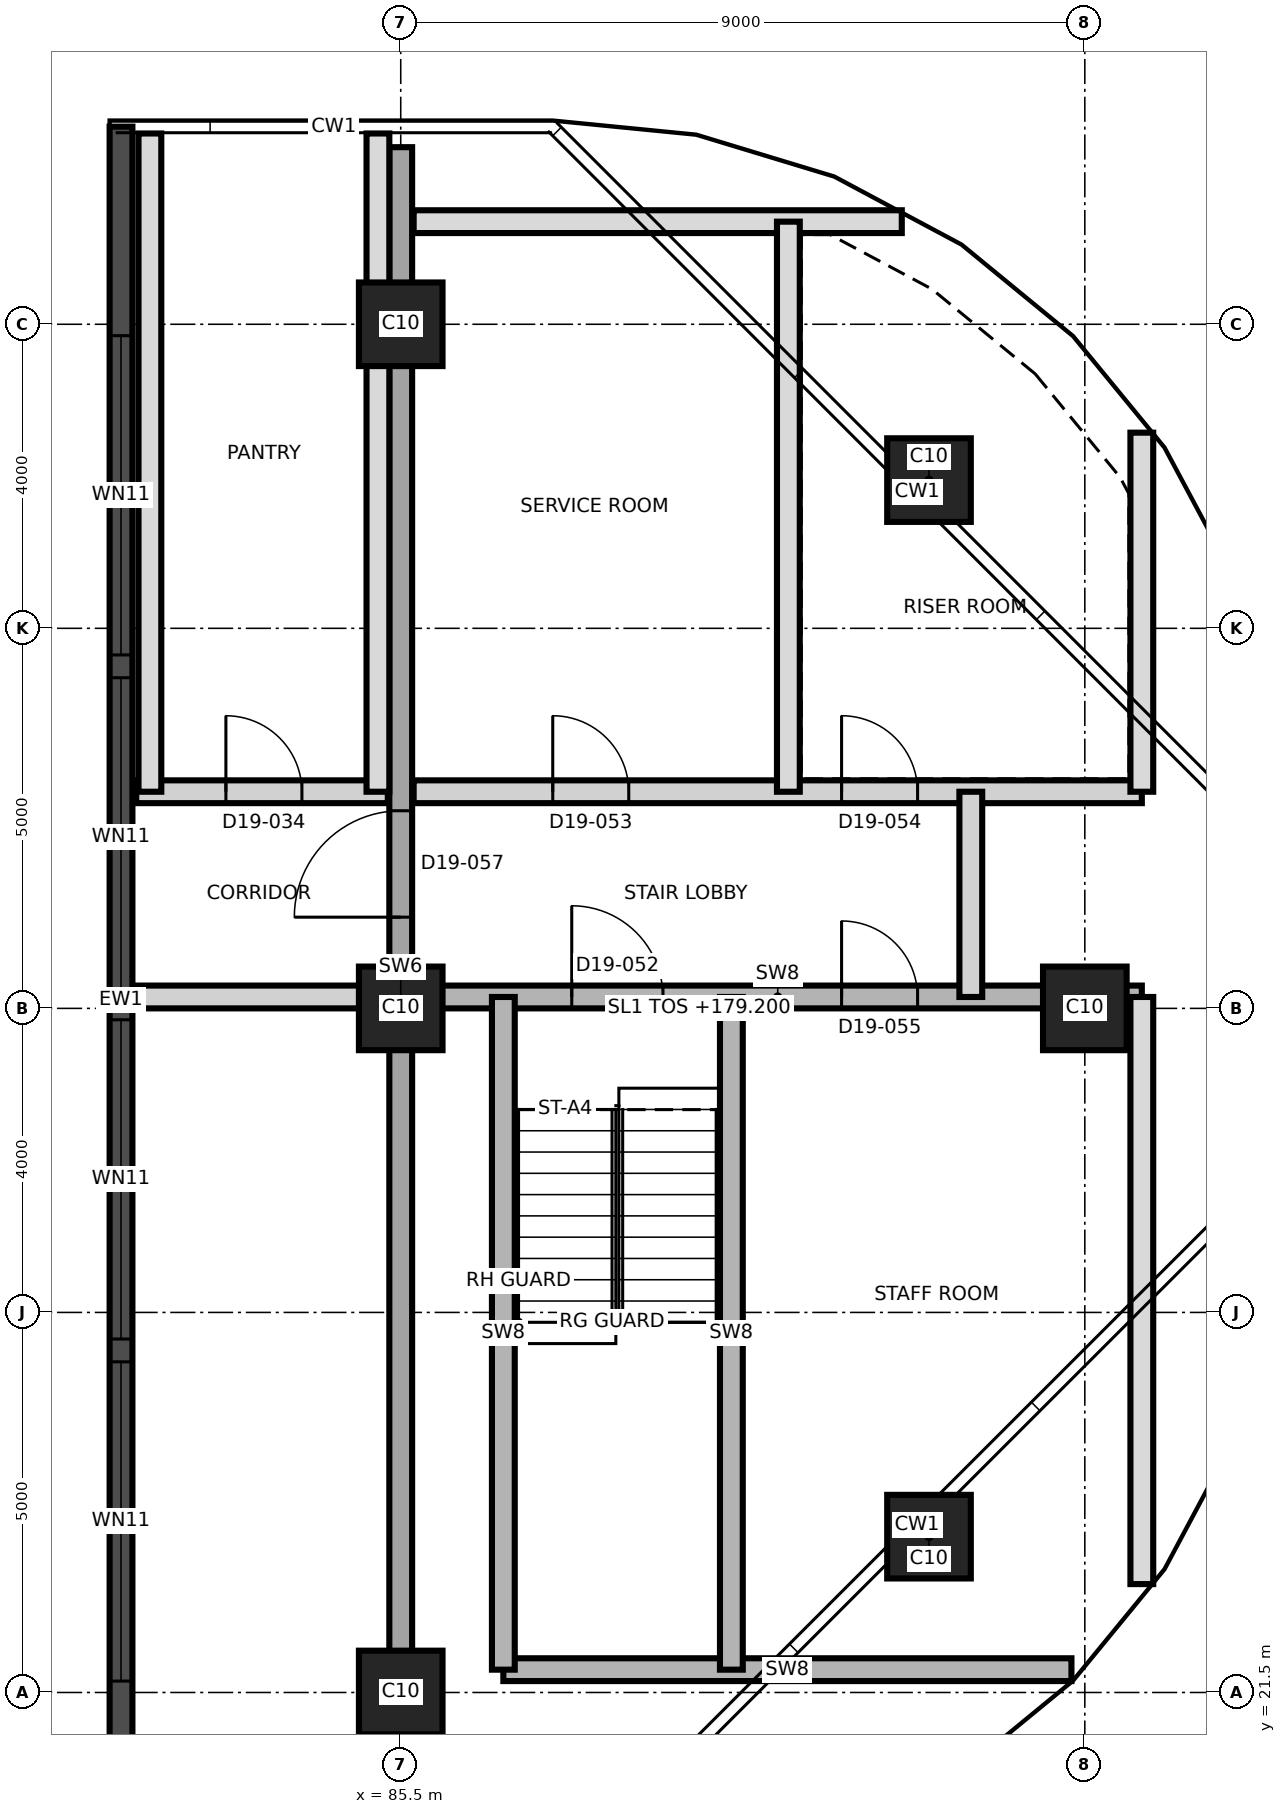
"""IFC4 building model, lengths in metres.
Left out: names, types, materials, properties, quantities, classifications, styles, units other than length and angle.
Written with IfcOpenShell. Run it as: python <this file> out.ifc"""

import sys

from ifc_helpers import new_model, si_unit, direction, frame, frame_2d, origin, origin_2d, place, context, subcontext, project, spatial, rectangle, extrude, element, fill, save


model = new_model("IFC4")
c1 = context("Model", 3, precision=1e-05, world=origin(), true_north=direction((0.0, 1.0)))
c2 = subcontext(c1, "Body", "Model", "MODEL_VIEW")
j1 = project(units=[si_unit("LENGTHUNIT", "METRE"), si_unit("PLANEANGLEUNIT", "RADIAN")], contexts=[c1])
p1 = place(None, origin())
s1 = spatial("IfcSite", under=j1, at=p1, CompositionType="ELEMENT")
p2 = place(p1, origin())
s2 = spatial("IfcBuilding", under=s1, at=p2, CompositionType="ELEMENT")
p3 = place(p2, frame((0.0, 0.0, 179.2)))
s3 = spatial("IfcBuildingStorey", under=s2, at=p3, CompositionType="ELEMENT", Elevation=179.2)
for number, where, z_axis, x_axis in (
    (1, (85.5, 21.5, 0.0), (0.0, 0.0, 1.0), (1.0, 0.0, 0.0)),
    (2, (92.45, 23.55, 0.0), (0.0, 0.0, 1.0), (1.0, 0.0, 0.0)),
    (3, (85.5, 30.5, 0.0), (0.0, 0.0, 1.0), (1.0, 0.0, 0.0)),
    (4, (94.5, 30.5, 0.0), (0.0, 0.0, 1.0), (1.0, 0.0, 0.0)),
    (5, (92.45, 37.45, 0.0), (0.0, 0.0, 1.0), (1.0, 0.0, 0.0)),
    (6, (85.5, 39.5, 0.0), (0.0, 0.0, 1.0), (1.0, 0.0, 0.0)),
):
    element("IfcColumn", number, at=place(p3, frame(where, z_axis=z_axis, x_axis=x_axis)), inside=s3, PredefinedType="COLUMN", context=c2, shape_type="SweptSolid", body=[
        extrude(rectangle(XDim=1.1, YDim=1.1, at=origin_2d()), origin(), (0.0, 0.0, 1.0), 3.7),
    ])
p4 = place(p3, frame((85.5, 19.17, 0.0), z_axis=(0.0, 0.0, 1.0), x_axis=(0.0, 1.0, 0.0)))
e7 = element("IfcWall", 7, at=p4, inside=s3, PredefinedType="SHEAR", context=c2, shape_type="SweptSolid", body=[
    extrude(rectangle(XDim=22.66, YDim=0.3, at=frame_2d((11.33, 0.0))), origin(), (0.0, 0.0, 1.0), 3.7),
])
p5 = place(p4, frame((12.53, 0.0, 0.0)))
e8 = element("IfcOpeningElement", 8, at=p5, cuts=e7, PredefinedType="OPENING", context=c2, shape_type="SweptSolid", body=[
    extrude(rectangle(XDim=1.4, YDim=2.1, at=frame_2d((0.7, 1.05))), frame((0.0, 0.16, 0.0), z_axis=(0.0, -1.0, 0.0), x_axis=(1.0, 0.0, 0.0)), (0.0, 0.0, 1.0), 0.32),
])
p6 = place(p3, frame((81.82, 42.1, 0.0), z_axis=(0.0, 0.0, 1.0), x_axis=(0.0, -1.0, 0.0)))
e9 = element("IfcWall", 9, at=p6, inside=s3, PredefinedType="SOLIDWALL", context=c2, shape_type="SweptSolid", body=[
    extrude(rectangle(XDim=22.98, YDim=0.3, at=frame_2d((11.49, 0.0))), origin(), (0.0, 0.0, 1.0), 3.4),
])
p7 = place(p6, frame((2.75, 0.0, 0.9)))
e10 = element("IfcOpeningElement", 10, at=p7, cuts=e9, PredefinedType="OPENING", context=c2, shape_type="SweptSolid", body=[
    extrude(rectangle(XDim=4.2, YDim=1.5, at=frame_2d((2.1, 0.75))), frame((0.0, 0.16, 0.0), z_axis=(0.0, -1.0, 0.0), x_axis=(1.0, 0.0, 0.0)), (0.0, 0.0, 1.0), 0.32),
])
p8 = place(p6, frame((7.25, 0.0, 0.9)))
e11 = element("IfcOpeningElement", 11, at=p8, cuts=e9, PredefinedType="OPENING", context=c2, shape_type="SweptSolid", body=[
    extrude(rectangle(XDim=4.2, YDim=1.5, at=frame_2d((2.1, 0.75))), frame((0.0, 0.16, 0.0), z_axis=(0.0, -1.0, 0.0), x_axis=(1.0, 0.0, 0.0)), (0.0, 0.0, 1.0), 0.32),
])
p9 = place(p6, frame((11.75, 0.0, 0.9)))
e12 = element("IfcOpeningElement", 12, at=p9, cuts=e9, PredefinedType="OPENING", context=c2, shape_type="SweptSolid", body=[
    extrude(rectangle(XDim=4.2, YDim=1.5, at=frame_2d((2.1, 0.75))), frame((0.0, 0.16, 0.0), z_axis=(0.0, -1.0, 0.0), x_axis=(1.0, 0.0, 0.0)), (0.0, 0.0, 1.0), 0.32),
])
p10 = place(p6, frame((16.25, 0.0, 0.9)))
e13 = element("IfcOpeningElement", 13, at=p10, cuts=e9, PredefinedType="OPENING", context=c2, shape_type="SweptSolid", body=[
    extrude(rectangle(XDim=4.2, YDim=1.5, at=frame_2d((2.1, 0.75))), frame((0.0, 0.16, 0.0), z_axis=(0.0, -1.0, 0.0), x_axis=(1.0, 0.0, 0.0)), (0.0, 0.0, 1.0), 0.32),
])
p11 = place(p3, frame((86.85, 21.8, 0.0), z_axis=(0.0, 0.0, 1.0), x_axis=(1.0, 0.0, 0.0)))
e14 = element("IfcWall", 14, at=p11, inside=s3, PredefinedType="SHEAR", context=c2, shape_type="SweptSolid", body=[
    extrude(rectangle(XDim=7.474, YDim=0.3, at=frame_2d((3.737, 0.0))), origin(), (0.0, 0.0, 1.0), 3.4),
])
p12 = place(p3, frame((82.02, 30.65, 0.0), z_axis=(0.0, 0.0, 1.0), x_axis=(1.0, 0.0, 0.0)))
e15 = element("IfcWall", 15, at=p12, inside=s3, PredefinedType="PARTITIONING", context=c2, shape_type="SweptSolid", body=[
    extrude(rectangle(XDim=3.31, YDim=0.3, at=frame_2d((1.655, 0.0))), origin(), (0.0, 0.0, 1.0), 3.4),
])
p13 = place(p3, frame((85.67, 30.65, 0.0), z_axis=(0.0, 0.0, 1.0), x_axis=(1.0, 0.0, 0.0)))
e16 = element("IfcWall", 16, at=p13, inside=s3, PredefinedType="SHEAR", context=c2, shape_type="SweptSolid", body=[
    extrude(rectangle(XDim=9.58, YDim=0.3, at=frame_2d((4.79, 0.0))), origin(), (0.0, 0.0, 1.0), 3.4),
])
p14 = place(p13, frame((2.08, 0.0, 0.0)))
e17 = element("IfcOpeningElement", 17, at=p14, cuts=e16, PredefinedType="OPENING", context=c2, shape_type="SweptSolid", body=[
    extrude(rectangle(XDim=1.2, YDim=2.1, at=frame_2d((0.6, 1.05))), frame((0.0, 0.16, 0.0), z_axis=(0.0, -1.0, 0.0), x_axis=(1.0, 0.0, 0.0)), (0.0, 0.0, 1.0), 0.32),
])
p15 = place(p13, frame((5.63, 0.0, 0.0)))
e18 = element("IfcOpeningElement", 18, at=p15, cuts=e16, PredefinedType="OPENING", context=c2, shape_type="SweptSolid", body=[
    extrude(rectangle(XDim=1.0, YDim=2.1, at=frame_2d((0.5, 1.05))), frame((0.0, 0.16, 0.0), z_axis=(0.0, -1.0, 0.0), x_axis=(1.0, 0.0, 0.0)), (0.0, 0.0, 1.0), 0.32),
])
p16 = place(p3, frame((82.02, 33.35, 0.0), z_axis=(0.0, 0.0, 1.0), x_axis=(1.0, 0.0, 0.0)))
e19 = element("IfcWall", 19, at=p16, inside=s3, PredefinedType="PARTITIONING", context=c2, shape_type="SweptSolid", body=[
    extrude(rectangle(XDim=3.31, YDim=0.3, at=frame_2d((1.655, 0.0))), origin(), (0.0, 0.0, 1.0), 3.4),
])
p17 = place(p16, frame((1.18, 0.0, 0.0)))
e20 = element("IfcOpeningElement", 20, at=p17, cuts=e19, PredefinedType="OPENING", context=c2, shape_type="SweptSolid", body=[
    extrude(rectangle(XDim=1.0, YDim=2.1, at=frame_2d((0.5, 1.05))), frame((0.0, 0.16, 0.0), z_axis=(0.0, -1.0, 0.0), x_axis=(1.0, 0.0, 0.0)), (0.0, 0.0, 1.0), 0.32),
])
p18 = place(p3, frame((85.67, 33.35, 0.0), z_axis=(0.0, 0.0, 1.0), x_axis=(1.0, 0.0, 0.0)))
e21 = element("IfcWall", 21, at=p18, inside=s3, PredefinedType="PARTITIONING", context=c2, shape_type="SweptSolid", body=[
    extrude(rectangle(XDim=9.58, YDim=0.3, at=frame_2d((4.79, 0.0))), origin(), (0.0, 0.0, 1.0), 3.4),
])
p19 = place(p18, frame((1.83, 0.0, 0.0)))
e22 = element("IfcOpeningElement", 22, at=p19, cuts=e21, PredefinedType="OPENING", context=c2, shape_type="SweptSolid", body=[
    extrude(rectangle(XDim=1.0, YDim=2.1, at=frame_2d((0.5, 1.05))), frame((0.0, 0.16, 0.0), z_axis=(0.0, -1.0, 0.0), x_axis=(1.0, 0.0, 0.0)), (0.0, 0.0, 1.0), 0.32),
])
p20 = place(p18, frame((5.63, 0.0, 0.0)))
e23 = element("IfcOpeningElement", 23, at=p20, cuts=e21, PredefinedType="OPENING", context=c2, shape_type="SweptSolid", body=[
    extrude(rectangle(XDim=1.0, YDim=2.1, at=frame_2d((0.5, 1.05))), frame((0.0, 0.16, 0.0), z_axis=(0.0, -1.0, 0.0), x_axis=(1.0, 0.0, 0.0)), (0.0, 0.0, 1.0), 0.32),
])
p21 = place(p3, frame((85.67, 40.85, 0.0), z_axis=(0.0, 0.0, 1.0), x_axis=(1.0, 0.0, 0.0)))
e24 = element("IfcWall", 24, at=p21, inside=s3, PredefinedType="PARTITIONING", context=c2, shape_type="SweptSolid", body=[
    extrude(rectangle(XDim=6.422, YDim=0.3, at=frame_2d((3.211, 0.0))), origin(), (0.0, 0.0, 1.0), 3.4),
])
for number, where, z_axis, x_axis in (
    (25, (82.2, 33.35, 0.0), (0.0, 0.0, 1.0), (0.0, 1.0, 0.0)),
    (26, (85.2, 33.35, 0.0), (0.0, 0.0, 1.0), (0.0, 1.0, 0.0)),
):
    element("IfcWall", number, at=place(p3, frame(where, z_axis=z_axis, x_axis=x_axis)), inside=s3, PredefinedType="PARTITIONING", context=c2, shape_type="SweptSolid", body=[
        extrude(rectangle(XDim=8.66, YDim=0.3, at=frame_2d((4.33, 0.0))), origin(), (0.0, 0.0, 1.0), 3.4),
    ])
for number, where, z_axis, x_axis in (
    (27, (86.85, 21.8, 0.0), (0.0, 0.0, 1.0), (0.0, 1.0, 0.0)),
    (28, (89.85, 21.8, 0.0), (0.0, 0.0, 1.0), (0.0, 1.0, 0.0)),
):
    element("IfcWall", number, at=place(p3, frame(where, z_axis=z_axis, x_axis=x_axis)), inside=s3, PredefinedType="SHEAR", context=c2, shape_type="SweptSolid", body=[
        extrude(rectangle(XDim=8.85, YDim=0.3, at=frame_2d((4.425, 0.0))), origin(), (0.0, 0.0, 1.0), 3.4),
    ])
p22 = place(p3, frame((90.6, 33.35, 0.0), z_axis=(0.0, 0.0, 1.0), x_axis=(0.0, 1.0, 0.0)))
e29 = element("IfcWall", 29, at=p22, inside=s3, PredefinedType="PARTITIONING", context=c2, shape_type="SweptSolid", body=[
    extrude(rectangle(XDim=7.5, YDim=0.3, at=frame_2d((3.75, 0.0))), origin(), (0.0, 0.0, 1.0), 3.4),
])
p23 = place(p3, frame((93.0, 30.65, 0.0), z_axis=(0.0, 0.0, 1.0), x_axis=(0.0, 1.0, 0.0)))
e30 = element("IfcWall", 30, at=p23, inside=s3, PredefinedType="PARTITIONING", context=c2, shape_type="SweptSolid", body=[
    extrude(rectangle(XDim=2.7, YDim=0.3, at=frame_2d((1.35, 0.0))), origin(), (0.0, 0.0, 1.0), 3.4),
])
p24 = place(p3, frame((95.25, 22.926, 0.0), z_axis=(0.0, 0.0, 1.0), x_axis=(0.0, 1.0, 0.0)))
e31 = element("IfcWall", 31, at=p24, inside=s3, PredefinedType="PARTITIONING", context=c2, shape_type="SweptSolid", body=[
    extrude(rectangle(XDim=7.724, YDim=0.3, at=frame_2d((3.862, 0.0))), origin(), (0.0, 0.0, 1.0), 3.4),
])
p25 = place(p3, frame((95.25, 33.35, 0.0), z_axis=(0.0, 0.0, 1.0), x_axis=(0.0, 1.0, 0.0)))
e32 = element("IfcWall", 32, at=p25, inside=s3, PredefinedType="PARTITIONING", context=c2, shape_type="SweptSolid", body=[
    extrude(rectangle(XDim=4.724, YDim=0.3, at=frame_2d((2.362, 0.0))), origin(), (0.0, 0.0, 1.0), 3.4),
])
p26 = place(p7, origin())
e33 = element("IfcWindow", 33, at=p26, inside=s3, PartitioningType="SINGLE_PANEL", PredefinedType="WINDOW", context=c2, shape_type="SweptSolid", body=[
    extrude(rectangle(XDim=4.2, YDim=1.5, at=frame_2d((2.1, 0.75))), frame((0.0, 0.03, 0.0), z_axis=(0.0, -1.0, 0.0), x_axis=(1.0, 0.0, 0.0)), (0.0, 0.0, 1.0), 0.06),
])
fill(e10, e33)
p27 = place(p8, origin())
e34 = element("IfcWindow", 34, at=p27, inside=s3, PartitioningType="SINGLE_PANEL", PredefinedType="WINDOW", context=c2, shape_type="SweptSolid", body=[
    extrude(rectangle(XDim=4.2, YDim=1.5, at=frame_2d((2.1, 0.75))), frame((0.0, 0.03, 0.0), z_axis=(0.0, -1.0, 0.0), x_axis=(1.0, 0.0, 0.0)), (0.0, 0.0, 1.0), 0.06),
])
fill(e11, e34)
p28 = place(p9, origin())
e35 = element("IfcWindow", 35, at=p28, inside=s3, PartitioningType="SINGLE_PANEL", PredefinedType="WINDOW", context=c2, shape_type="SweptSolid", body=[
    extrude(rectangle(XDim=4.2, YDim=1.5, at=frame_2d((2.1, 0.75))), frame((0.0, 0.03, 0.0), z_axis=(0.0, -1.0, 0.0), x_axis=(1.0, 0.0, 0.0)), (0.0, 0.0, 1.0), 0.06),
])
fill(e12, e35)
p29 = place(p10, origin())
e36 = element("IfcWindow", 36, at=p29, inside=s3, PartitioningType="SINGLE_PANEL", PredefinedType="WINDOW", context=c2, shape_type="SweptSolid", body=[
    extrude(rectangle(XDim=4.2, YDim=1.5, at=frame_2d((2.1, 0.75))), frame((0.0, 0.03, 0.0), z_axis=(0.0, -1.0, 0.0), x_axis=(1.0, 0.0, 0.0)), (0.0, 0.0, 1.0), 0.06),
])
fill(e13, e36)
p30 = place(p17, origin())
e37 = element("IfcDoor", 37, at=p30, inside=s3, OperationType="SINGLE_SWING_RIGHT", PredefinedType="DOOR", context=c2, shape_type="SweptSolid", body=[
    extrude(rectangle(XDim=1.0, YDim=2.1, at=frame_2d((0.5, 1.05))), frame((0.0, 0.025, 0.0), z_axis=(0.0, -1.0, 0.0), x_axis=(1.0, 0.0, 0.0)), (0.0, 0.0, 1.0), 0.05),
])
fill(e20, e37)
p31 = place(p14, origin())
e38 = element("IfcDoor", 38, at=p31, inside=s3, OperationType="SINGLE_SWING_LEFT", PredefinedType="DOOR", context=c2, shape_type="SweptSolid", body=[
    extrude(rectangle(XDim=1.2, YDim=2.1, at=frame_2d((0.6, 1.05))), frame((0.0, 0.025, 0.0), z_axis=(0.0, -1.0, 0.0), x_axis=(1.0, 0.0, 0.0)), (0.0, 0.0, 1.0), 0.05),
])
fill(e17, e38)
p32 = place(p19, origin())
e39 = element("IfcDoor", 39, at=p32, inside=s3, OperationType="SINGLE_SWING_LEFT", PredefinedType="DOOR", context=c2, shape_type="SweptSolid", body=[
    extrude(rectangle(XDim=1.0, YDim=2.1, at=frame_2d((0.5, 1.05))), frame((0.0, 0.025, 0.0), z_axis=(0.0, -1.0, 0.0), x_axis=(1.0, 0.0, 0.0)), (0.0, 0.0, 1.0), 0.05),
])
fill(e22, e39)
p33 = place(p20, origin())
e40 = element("IfcDoor", 40, at=p33, inside=s3, OperationType="SINGLE_SWING_RIGHT", PredefinedType="DOOR", context=c2, shape_type="SweptSolid", body=[
    extrude(rectangle(XDim=1.0, YDim=2.1, at=frame_2d((0.5, 1.05))), frame((0.0, 0.025, 0.0), z_axis=(0.0, -1.0, 0.0), x_axis=(1.0, 0.0, 0.0)), (0.0, 0.0, 1.0), 0.05),
])
fill(e23, e40)
p34 = place(p15, origin())
e41 = element("IfcDoor", 41, at=p34, inside=s3, OperationType="SINGLE_SWING_LEFT", PredefinedType="DOOR", context=c2, shape_type="SweptSolid", body=[
    extrude(rectangle(XDim=1.0, YDim=2.1, at=frame_2d((0.5, 1.05))), frame((0.0, 0.025, 0.0), z_axis=(0.0, -1.0, 0.0), x_axis=(1.0, 0.0, 0.0)), (0.0, 0.0, 1.0), 0.05),
])
fill(e18, e41)
p35 = place(p5, origin())
e42 = element("IfcDoor", 42, at=p35, inside=s3, OperationType="SINGLE_SWING_RIGHT", PredefinedType="DOOR", context=c2, shape_type="SweptSolid", body=[
    extrude(rectangle(XDim=1.4, YDim=2.1, at=frame_2d((0.7, 1.05))), frame((0.0, 0.025, 0.0), z_axis=(0.0, -1.0, 0.0), x_axis=(1.0, 0.0, 0.0)), (0.0, 0.0, 1.0), 0.05),
])
fill(e8, e42)
save(model, sys.argv[1])
